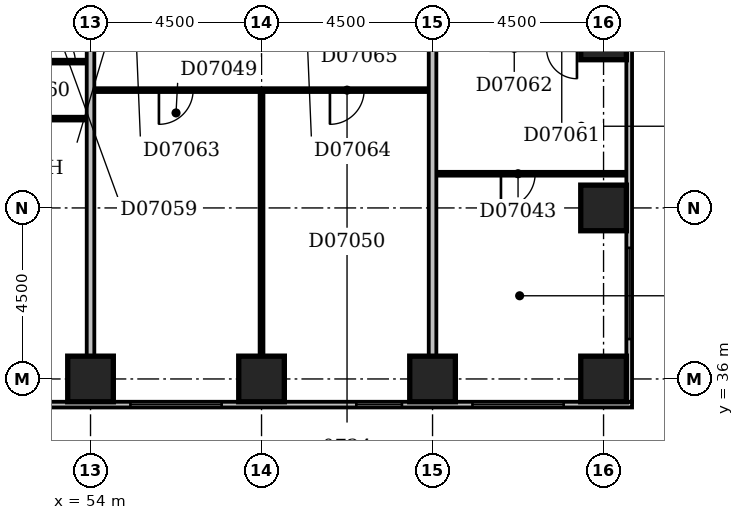
"""IFC4 building model, lengths in metres.
Left out: names, types, materials, properties, quantities, classifications, styles, units other than length and angle.
Written with IfcOpenShell. Run it as: python <this file> out.ifc"""

import sys

from ifc_helpers import new_model, si_unit, direction, frame, frame_2d, origin, origin_2d, place, context, subcontext, project, spatial, rectangle, extrude, element, fill, save


model = new_model("IFC4")
c1 = context("Model", 3, precision=1e-05, world=origin(), true_north=direction((0.0, 1.0)))
c2 = subcontext(c1, "Body", "Model", "MODEL_VIEW")
j1 = project(units=[si_unit("LENGTHUNIT", "METRE"), si_unit("PLANEANGLEUNIT", "RADIAN")], contexts=[c1])
p1 = place(None, origin())
s1 = spatial("IfcSite", under=j1, at=p1, CompositionType="ELEMENT")
p2 = place(p1, origin())
s2 = spatial("IfcBuilding", under=s1, at=p2, CompositionType="ELEMENT")
p3 = place(p2, frame((0.0, 0.0, 36.2)))
s3 = spatial("IfcBuildingStorey", under=s2, at=p3, CompositionType="ELEMENT", Elevation=36.2)
for number, where, z_axis, x_axis in (
    (1, (54.0, 36.0, -0.3), (0.0, 0.0, 1.0), (1.0, 0.0, 0.0)),
    (2, (58.5, 36.0, -0.3), (0.0, 0.0, 1.0), (1.0, 0.0, 0.0)),
    (3, (63.0, 36.0, -0.3), (0.0, 0.0, 1.0), (1.0, 0.0, 0.0)),
    (4, (67.5, 36.0, -0.3), (0.0, 0.0, 1.0), (1.0, 0.0, 0.0)),
    (5, (67.5, 40.5, -0.3), (0.0, 0.0, 1.0), (1.0, 0.0, 0.0)),
    (6, (67.5, 45.0, -0.3), (0.0, 0.0, 1.0), (1.0, 0.0, 0.0)),
):
    element("IfcColumn", number, at=place(p3, frame(where, z_axis=z_axis, x_axis=x_axis)), inside=s3, PredefinedType="COLUMN", context=c2, shape_type="SweptSolid", body=[
        extrude(rectangle(XDim=1.2, YDim=1.2, at=origin_2d()), origin(), (0.0, 0.0, 1.0), 3.6),
    ])
p4 = place(p3, frame((23.1, 35.325, 0.0), z_axis=(0.0, 0.0, 1.0), x_axis=(1.0, 0.0, 0.0)))
e7 = element("IfcWall", 7, at=p4, inside=s3, PredefinedType="STANDARD", context=c2, shape_type="SweptSolid", body=[
    extrude(rectangle(XDim=45.15, YDim=0.15, at=frame_2d((22.575, 0.0))), origin(), (0.0, 0.0, 1.0), 2.7),
])
p5 = place(p4, frame((0.45, 0.0, 0.6)))
e8 = element("IfcOpeningElement", 8, at=p5, cuts=e7, PredefinedType="OPENING", context=c2, shape_type="SweptSolid", body=[
    extrude(rectangle(XDim=2.4, YDim=1.8, at=frame_2d((1.2, 0.9))), frame((0.0, 0.087, 0.0), z_axis=(0.0, -1.0, 0.0), x_axis=(1.0, 0.0, 0.0)), (0.0, 0.0, 1.0), 0.174),
])
p6 = place(p4, frame((4.776, 0.0, 0.6)))
e9 = element("IfcOpeningElement", 9, at=p6, cuts=e7, PredefinedType="OPENING", context=c2, shape_type="SweptSolid", body=[
    extrude(rectangle(XDim=1.8, YDim=1.8, at=frame_2d((0.9, 0.9))), frame((0.0, 0.087, 0.0), z_axis=(0.0, -1.0, 0.0), x_axis=(1.0, 0.0, 0.0)), (0.0, 0.0, 1.0), 0.174),
])
p7 = place(p4, frame((9.45, 0.0, 0.6)))
e10 = element("IfcOpeningElement", 10, at=p7, cuts=e7, PredefinedType="OPENING", context=c2, shape_type="SweptSolid", body=[
    extrude(rectangle(XDim=2.4, YDim=1.8, at=frame_2d((1.2, 0.9))), frame((0.0, 0.087, 0.0), z_axis=(0.0, -1.0, 0.0), x_axis=(1.0, 0.0, 0.0)), (0.0, 0.0, 1.0), 0.174),
])
p8 = place(p4, frame((13.95, 0.0, 0.6)))
e11 = element("IfcOpeningElement", 11, at=p8, cuts=e7, PredefinedType="OPENING", context=c2, shape_type="SweptSolid", body=[
    extrude(rectangle(XDim=2.4, YDim=1.8, at=frame_2d((1.2, 0.9))), frame((0.0, 0.087, 0.0), z_axis=(0.0, -1.0, 0.0), x_axis=(1.0, 0.0, 0.0)), (0.0, 0.0, 1.0), 0.174),
])
p9 = place(p4, frame((19.777, 0.0, 0.6)))
e12 = element("IfcOpeningElement", 12, at=p9, cuts=e7, PredefinedType="OPENING", context=c2, shape_type="SweptSolid", body=[
    extrude(rectangle(XDim=1.2, YDim=1.8, at=frame_2d((0.6, 0.9))), frame((0.0, 0.087, 0.0), z_axis=(0.0, -1.0, 0.0), x_axis=(1.0, 0.0, 0.0)), (0.0, 0.0, 1.0), 0.174),
])
p10 = place(p4, frame((22.95, 0.0, 0.6)))
e13 = element("IfcOpeningElement", 13, at=p10, cuts=e7, PredefinedType="OPENING", context=c2, shape_type="SweptSolid", body=[
    extrude(rectangle(XDim=2.4, YDim=1.8, at=frame_2d((1.2, 0.9))), frame((0.0, 0.087, 0.0), z_axis=(0.0, -1.0, 0.0), x_axis=(1.0, 0.0, 0.0)), (0.0, 0.0, 1.0), 0.174),
])
p11 = place(p4, frame((27.45, 0.0, 0.6)))
e14 = element("IfcOpeningElement", 14, at=p11, cuts=e7, PredefinedType="OPENING", context=c2, shape_type="SweptSolid", body=[
    extrude(rectangle(XDim=2.4, YDim=1.8, at=frame_2d((1.2, 0.9))), frame((0.0, 0.087, 0.0), z_axis=(0.0, -1.0, 0.0), x_axis=(1.0, 0.0, 0.0)), (0.0, 0.0, 1.0), 0.174),
])
p12 = place(p4, frame((31.95, 0.0, 0.6)))
e15 = element("IfcOpeningElement", 15, at=p12, cuts=e7, PredefinedType="OPENING", context=c2, shape_type="SweptSolid", body=[
    extrude(rectangle(XDim=2.4, YDim=1.8, at=frame_2d((1.2, 0.9))), frame((0.0, 0.087, 0.0), z_axis=(0.0, -1.0, 0.0), x_axis=(1.0, 0.0, 0.0)), (0.0, 0.0, 1.0), 0.174),
])
p13 = place(p4, frame((37.894, 0.0, 0.6)))
e16 = element("IfcOpeningElement", 16, at=p13, cuts=e7, PredefinedType="OPENING", context=c2, shape_type="SweptSolid", body=[
    extrude(rectangle(XDim=1.2, YDim=1.8, at=frame_2d((0.6, 0.9))), frame((0.0, 0.087, 0.0), z_axis=(0.0, -1.0, 0.0), x_axis=(1.0, 0.0, 0.0)), (0.0, 0.0, 1.0), 0.174),
])
p14 = place(p4, frame((40.95, 0.0, 0.6)))
e17 = element("IfcOpeningElement", 17, at=p14, cuts=e7, PredefinedType="OPENING", context=c2, shape_type="SweptSolid", body=[
    extrude(rectangle(XDim=2.4, YDim=1.8, at=frame_2d((1.2, 0.9))), frame((0.0, 0.087, 0.0), z_axis=(0.0, -1.0, 0.0), x_axis=(1.0, 0.0, 0.0)), (0.0, 0.0, 1.0), 0.174),
])
p15 = place(p3, frame((68.175, 35.4, 0.0), z_axis=(0.0, 0.0, 1.0), x_axis=(0.0, 1.0, 0.0)))
e18 = element("IfcWall", 18, at=p15, inside=s3, PredefinedType="STANDARD", context=c2, shape_type="SweptSolid", body=[
    extrude(rectangle(XDim=23.85, YDim=0.15, at=frame_2d((11.925, 0.0))), origin(), (0.0, 0.0, 1.0), 2.7),
])
p16 = place(p15, frame((1.65, 0.0, 0.6)))
e19 = element("IfcOpeningElement", 19, at=p16, cuts=e18, PredefinedType="OPENING", context=c2, shape_type="SweptSolid", body=[
    extrude(rectangle(XDim=2.4, YDim=1.8, at=frame_2d((1.2, 0.9))), frame((0.0, 0.087, 0.0), z_axis=(0.0, -1.0, 0.0), x_axis=(1.0, 0.0, 0.0)), (0.0, 0.0, 1.0), 0.174),
])
p17 = place(p15, frame((19.65, 0.0, 0.6)))
e20 = element("IfcOpeningElement", 20, at=p17, cuts=e18, PredefinedType="OPENING", context=c2, shape_type="SweptSolid", body=[
    extrude(rectangle(XDim=2.4, YDim=1.8, at=frame_2d((1.2, 0.9))), frame((0.0, 0.087, 0.0), z_axis=(0.0, -1.0, 0.0), x_axis=(1.0, 0.0, 0.0)), (0.0, 0.0, 1.0), 0.174),
])
p18 = place(p3, frame((54.0, 36.6, 0.0), z_axis=(0.0, 0.0, 1.0), x_axis=(0.0, 1.0, 0.0)))
e21 = element("IfcWall", 21, at=p18, inside=s3, PredefinedType="PARTITIONING", context=c2, shape_type="SweptSolid", body=[
    extrude(rectangle(XDim=12.8, YDim=0.2, at=frame_2d((6.4, 0.0))), origin(), (0.0, 0.0, 1.0), 2.6),
])
p19 = place(p3, frame((58.5, 36.6, 0.0), z_axis=(0.0, 0.0, 1.0), x_axis=(0.0, 1.0, 0.0)))
e22 = element("IfcWall", 22, at=p19, inside=s3, PredefinedType="PARTITIONING", context=c2, shape_type="SweptSolid", body=[
    extrude(rectangle(XDim=6.95, YDim=0.1, at=frame_2d((3.475, 0.0))), origin(), (0.0, 0.0, 1.0), 3.3),
])
p20 = place(p3, frame((63.0, 36.6, 0.0), z_axis=(0.0, 0.0, 1.0), x_axis=(0.0, 1.0, 0.0)))
e23 = element("IfcWall", 23, at=p20, inside=s3, PredefinedType="PARTITIONING", context=c2, shape_type="SweptSolid", body=[
    extrude(rectangle(XDim=12.8, YDim=0.2, at=frame_2d((6.4, 0.0))), origin(), (0.0, 0.0, 1.0), 2.4),
])
p21 = place(p3, frame((63.1, 41.4, 0.0), z_axis=(0.0, 0.0, 1.0), x_axis=(1.0, 0.0, 0.0)))
e24 = element("IfcWall", 24, at=p21, inside=s3, PredefinedType="PARTITIONING", context=c2, shape_type="SweptSolid", body=[
    extrude(rectangle(XDim=5.0, YDim=0.1, at=frame_2d((2.5, 0.0))), origin(), (0.0, 0.0, 1.0), 3.3),
])
p22 = place(p21, frame((1.7, 0.0, 0.0)))
e25 = element("IfcOpeningElement", 25, at=p22, cuts=e24, PredefinedType="OPENING", context=c2, shape_type="SweptSolid", body=[
    extrude(rectangle(XDim=0.9, YDim=2.1, at=frame_2d((0.45, 1.05))), frame((0.0, 0.062, 0.0), z_axis=(0.0, -1.0, 0.0), x_axis=(1.0, 0.0, 0.0)), (0.0, 0.0, 1.0), 0.124),
])
p23 = place(p3, frame((40.6, 42.85, 0.0), z_axis=(0.0, 0.0, 1.0), x_axis=(1.0, 0.0, 0.0)))
e26 = element("IfcWall", 26, at=p23, inside=s3, PredefinedType="PARTITIONING", context=c2, shape_type="SweptSolid", body=[
    extrude(rectangle(XDim=13.3, YDim=0.1, at=frame_2d((6.65, 0.0))), origin(), (0.0, 0.0, 1.0), 3.3),
])
p24 = place(p23, frame((3.9, 0.0, 0.0)))
e27 = element("IfcOpeningElement", 27, at=p24, cuts=e26, PredefinedType="OPENING", context=c2, shape_type="SweptSolid", body=[
    extrude(rectangle(XDim=0.9, YDim=2.1, at=frame_2d((0.45, 1.05))), frame((0.0, 0.062, 0.0), z_axis=(0.0, -1.0, 0.0), x_axis=(1.0, 0.0, 0.0)), (0.0, 0.0, 1.0), 0.124),
])
p25 = place(p23, frame((10.7, 0.0, 0.0)))
e28 = element("IfcOpeningElement", 28, at=p25, cuts=e26, PredefinedType="OPENING", context=c2, shape_type="SweptSolid", body=[
    extrude(rectangle(XDim=0.9, YDim=2.1, at=frame_2d((0.45, 1.05))), frame((0.0, 0.062, 0.0), z_axis=(0.0, -1.0, 0.0), x_axis=(1.0, 0.0, 0.0)), (0.0, 0.0, 1.0), 0.124),
])
p26 = place(p3, frame((54.1, 43.6, 0.0), z_axis=(0.0, 0.0, 1.0), x_axis=(1.0, 0.0, 0.0)))
e29 = element("IfcWall", 29, at=p26, inside=s3, PredefinedType="PARTITIONING", context=c2, shape_type="SweptSolid", body=[
    extrude(rectangle(XDim=8.8, YDim=0.1, at=frame_2d((4.4, 0.0))), origin(), (0.0, 0.0, 1.0), 3.3),
])
p27 = place(p26, frame((1.7, 0.0, 0.0)))
e30 = element("IfcOpeningElement", 30, at=p27, cuts=e29, PredefinedType="OPENING", context=c2, shape_type="SweptSolid", body=[
    extrude(rectangle(XDim=0.9, YDim=2.1, at=frame_2d((0.45, 1.05))), frame((0.0, 0.062, 0.0), z_axis=(0.0, -1.0, 0.0), x_axis=(1.0, 0.0, 0.0)), (0.0, 0.0, 1.0), 0.124),
])
p28 = place(p26, frame((6.2, 0.0, 0.0)))
e31 = element("IfcOpeningElement", 31, at=p28, cuts=e29, PredefinedType="OPENING", context=c2, shape_type="SweptSolid", body=[
    extrude(rectangle(XDim=0.9, YDim=2.1, at=frame_2d((0.45, 1.05))), frame((0.0, 0.062, 0.0), z_axis=(0.0, -1.0, 0.0), x_axis=(1.0, 0.0, 0.0)), (0.0, 0.0, 1.0), 0.124),
])
p29 = place(p3, frame((42.15, 44.35, 0.0), z_axis=(0.0, 0.0, 1.0), x_axis=(1.0, 0.0, 0.0)))
e32 = element("IfcWall", 32, at=p29, inside=s3, PredefinedType="PARTITIONING", context=c2, shape_type="SweptSolid", body=[
    extrude(rectangle(XDim=11.75, YDim=0.1, at=frame_2d((5.875, 0.0))), origin(), (0.0, 0.0, 1.0), 3.3),
])
p30 = place(p29, frame((7.15, 0.0, 0.0)))
e33 = element("IfcOpeningElement", 33, at=p30, cuts=e32, PredefinedType="OPENING", context=c2, shape_type="SweptSolid", body=[
    extrude(rectangle(XDim=0.8, YDim=2.1, at=frame_2d((0.4, 1.05))), frame((0.0, 0.062, 0.0), z_axis=(0.0, -1.0, 0.0), x_axis=(1.0, 0.0, 0.0)), (0.0, 0.0, 1.0), 0.124),
])
p31 = place(p29, frame((2.7, 0.0, 0.0)))
e34 = element("IfcOpeningElement", 34, at=p31, cuts=e32, PredefinedType="OPENING", context=c2, shape_type="SweptSolid", body=[
    extrude(rectangle(XDim=0.9, YDim=2.1, at=frame_2d((0.45, 1.05))), frame((0.0, 0.062, 0.0), z_axis=(0.0, -1.0, 0.0), x_axis=(1.0, 0.0, 0.0)), (0.0, 0.0, 1.0), 0.124),
])
p32 = place(p29, frame((10.65, 0.0, 0.0)))
e35 = element("IfcOpeningElement", 35, at=p32, cuts=e32, PredefinedType="OPENING", context=c2, shape_type="SweptSolid", body=[
    extrude(rectangle(XDim=0.8, YDim=2.1, at=frame_2d((0.4, 1.05))), frame((0.0, 0.062, 0.0), z_axis=(0.0, -1.0, 0.0), x_axis=(1.0, 0.0, 0.0)), (0.0, 0.0, 1.0), 0.124),
])
p33 = place(p29, frame((9.1, 0.0, 0.0)))
e36 = element("IfcOpeningElement", 36, at=p33, cuts=e32, PredefinedType="OPENING", context=c2, shape_type="SweptSolid", body=[
    extrude(rectangle(XDim=0.8, YDim=2.1, at=frame_2d((0.4, 1.05))), frame((0.0, 0.062, 0.0), z_axis=(0.0, -1.0, 0.0), x_axis=(1.0, 0.0, 0.0)), (0.0, 0.0, 1.0), 0.124),
])
p34 = place(p12, origin())
e37 = element("IfcWindow", 37, at=p34, inside=s3, PartitioningType="SINGLE_PANEL", PredefinedType="WINDOW", context=c2, shape_type="SweptSolid", body=[
    extrude(rectangle(XDim=2.4, YDim=1.8, at=frame_2d((1.2, 0.9))), frame((0.0, 0.03, 0.0), z_axis=(0.0, -1.0, 0.0), x_axis=(1.0, 0.0, 0.0)), (0.0, 0.0, 1.0), 0.06),
])
fill(e15, e37)
p35 = place(p13, origin())
e38 = element("IfcWindow", 38, at=p35, inside=s3, PartitioningType="SINGLE_PANEL", PredefinedType="WINDOW", context=c2, shape_type="SweptSolid", body=[
    extrude(rectangle(XDim=1.2, YDim=1.8, at=frame_2d((0.6, 0.9))), frame((0.0, 0.03, 0.0), z_axis=(0.0, -1.0, 0.0), x_axis=(1.0, 0.0, 0.0)), (0.0, 0.0, 1.0), 0.06),
])
fill(e16, e38)
p36 = place(p14, origin())
e39 = element("IfcWindow", 39, at=p36, inside=s3, PartitioningType="SINGLE_PANEL", PredefinedType="WINDOW", context=c2, shape_type="SweptSolid", body=[
    extrude(rectangle(XDim=2.4, YDim=1.8, at=frame_2d((1.2, 0.9))), frame((0.0, 0.03, 0.0), z_axis=(0.0, -1.0, 0.0), x_axis=(1.0, 0.0, 0.0)), (0.0, 0.0, 1.0), 0.06),
])
fill(e17, e39)
p37 = place(p16, origin())
e40 = element("IfcWindow", 40, at=p37, inside=s3, PartitioningType="SINGLE_PANEL", PredefinedType="WINDOW", context=c2, shape_type="SweptSolid", body=[
    extrude(rectangle(XDim=2.4, YDim=1.8, at=frame_2d((1.2, 0.9))), frame((0.0, 0.03, 0.0), z_axis=(0.0, -1.0, 0.0), x_axis=(1.0, 0.0, 0.0)), (0.0, 0.0, 1.0), 0.06),
])
fill(e19, e40)
p38 = place(p22, frame((0.9, 0.0, 0.0), z_axis=(0.0, 0.0, 1.0), x_axis=(-1.0, 0.0, 0.0)))
e41 = element("IfcDoor", 41, at=p38, inside=s3, OperationType="SINGLE_SWING_RIGHT", PredefinedType="DOOR", context=c2, shape_type="SweptSolid", body=[
    extrude(rectangle(XDim=0.9, YDim=2.1, at=frame_2d((0.45, 1.05))), frame((0.0, 0.025, 0.0), z_axis=(0.0, -1.0, 0.0), x_axis=(1.0, 0.0, 0.0)), (0.0, 0.0, 1.0), 0.05),
])
fill(e25, e41)
p39 = place(p27, frame((0.9, 0.0, 0.0), z_axis=(0.0, 0.0, 1.0), x_axis=(-1.0, 0.0, 0.0)))
e42 = element("IfcDoor", 42, at=p39, inside=s3, OperationType="SINGLE_SWING_RIGHT", PredefinedType="DOOR", context=c2, shape_type="SweptSolid", body=[
    extrude(rectangle(XDim=0.9, YDim=2.1, at=frame_2d((0.45, 1.05))), frame((0.0, 0.025, 0.0), z_axis=(0.0, -1.0, 0.0), x_axis=(1.0, 0.0, 0.0)), (0.0, 0.0, 1.0), 0.05),
])
fill(e30, e42)
p40 = place(p28, frame((0.9, 0.0, 0.0), z_axis=(0.0, 0.0, 1.0), x_axis=(-1.0, 0.0, 0.0)))
e43 = element("IfcDoor", 43, at=p40, inside=s3, OperationType="SINGLE_SWING_RIGHT", PredefinedType="DOOR", context=c2, shape_type="SweptSolid", body=[
    extrude(rectangle(XDim=0.9, YDim=2.1, at=frame_2d((0.45, 1.05))), frame((0.0, 0.025, 0.0), z_axis=(0.0, -1.0, 0.0), x_axis=(1.0, 0.0, 0.0)), (0.0, 0.0, 1.0), 0.05),
])
fill(e31, e43)
p41 = place(p32, origin())
e44 = element("IfcDoor", 44, at=p41, inside=s3, OperationType="SINGLE_SWING_LEFT", PredefinedType="DOOR", context=c2, shape_type="SweptSolid", body=[
    extrude(rectangle(XDim=0.8, YDim=2.1, at=frame_2d((0.4, 1.05))), frame((0.0, 0.025, 0.0), z_axis=(0.0, -1.0, 0.0), x_axis=(1.0, 0.0, 0.0)), (0.0, 0.0, 1.0), 0.05),
])
fill(e35, e44)
save(model, sys.argv[1])
